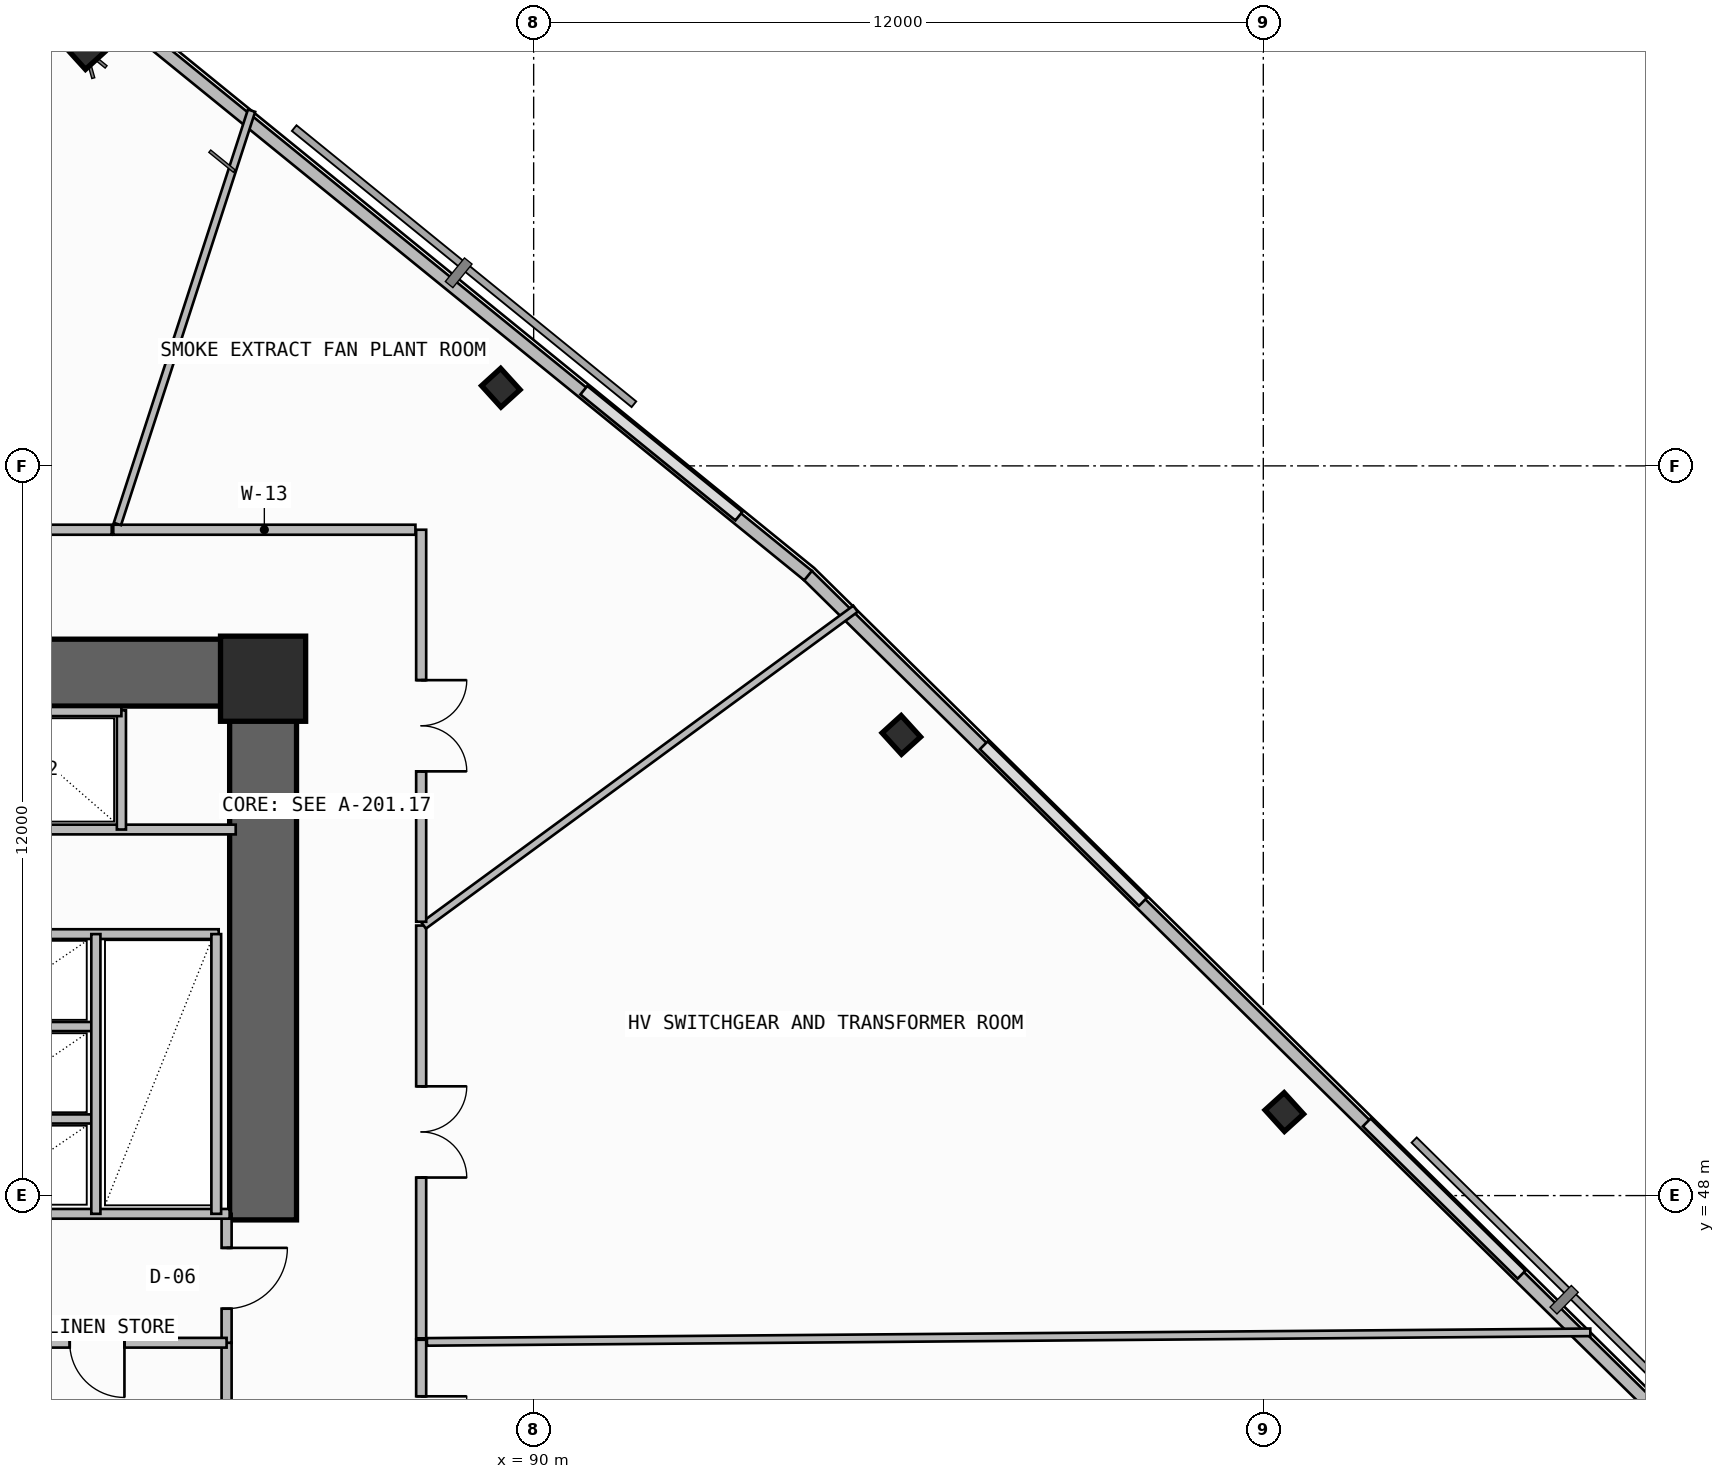
"""IFC4 building model, lengths in metres.
Left out: names, types, materials, properties, quantities, classifications, styles, units other than length and angle.
Written with IfcOpenShell. Run it as: python <this file> out.ifc"""

import sys

from ifc_helpers import new_model, si_unit, direction, frame, frame_2d, origin, origin_2d, place, context, subcontext, project, spatial, rectangle, i_section, extrude, element, fill, save


model = new_model("IFC4")
c1 = context("Model", 3, precision=1e-05, world=origin(), true_north=direction((0.0, 1.0)))
c2 = subcontext(c1, "Body", "Model", "MODEL_VIEW")
j1 = project(units=[si_unit("LENGTHUNIT", "METRE"), si_unit("PLANEANGLEUNIT", "RADIAN")], contexts=[c1])
p1 = place(None, origin())
s1 = spatial("IfcSite", under=j1, at=p1, CompositionType="ELEMENT")
p2 = place(p1, origin())
s2 = spatial("IfcBuilding", under=s1, at=p2, CompositionType="ELEMENT")
p3 = place(p2, frame((0.0, 0.0, 59.1)))
s3 = spatial("IfcBuildingStorey", under=s2, at=p3, CompositionType="ELEMENT", Elevation=59.1)
p4 = place(p3, frame((71.8, 56.6, -0.5), z_axis=(0.0, 0.0, 1.0), x_axis=(1.0, 0.0, 0.0)))
e1 = element("IfcWall", 1, at=p4, inside=s3, PredefinedType="SHEAR", context=c2, shape_type="SweptSolid", body=[
    extrude(rectangle(XDim=14.3, YDim=1.1, at=frame_2d((7.15, 0.0))), origin(), (0.0, 0.0, 1.0), 4.3),
])
p5 = place(p3, frame((85.55, 47.6, -0.5), z_axis=(0.0, 0.0, 1.0), x_axis=(0.0, 1.0, 0.0)))
e2 = element("IfcWall", 2, at=p5, inside=s3, PredefinedType="SHEAR", context=c2, shape_type="SweptSolid", body=[
    extrude(rectangle(XDim=8.45, YDim=1.1, at=frame_2d((4.225, 0.0))), origin(), (0.0, 0.0, 1.0), 4.3),
])
p6 = place(p3, frame((85.55, 56.5, 0.0), z_axis=(0.0, 0.0, 1.0), x_axis=(1.0, 0.0, 0.0)))
e3 = element("IfcColumn", 3, at=p6, inside=s3, PredefinedType="COLUMN", context=c2, shape_type="SweptSolid", body=[
    extrude(rectangle(XDim=1.4, YDim=1.4, at=origin_2d()), origin(), (0.0, 0.0, 1.0), 4.2),
])
for number, where, z_axis, x_axis in (
    (4, (102.345, 49.374, 0.0), (0.0, 0.0, 1.0), (0.74, 0.672, 0.0)),
    (5, (96.047, 55.576, 0.0), (0.0, 0.0, 1.0), (0.74, 0.672, 0.0)),
    (6, (89.46, 61.285, 0.0), (0.0, 0.0, 1.0), (0.74, 0.672, 0.0)),
    (7, (82.627, 66.839, 0.0), (0.0, 0.0, 1.0), (0.74, 0.672, 0.0)),
):
    element("IfcColumn", number, at=place(p3, frame(where, z_axis=z_axis, x_axis=x_axis)), inside=s3, PredefinedType="COLUMN", context=c2, shape_type="SweptSolid", body=[
        extrude(i_section(OverallWidth=0.424, OverallDepth=0.474, WebThickness=0.048, FlangeThickness=0.077, FilletRadius=0.015, at=origin_2d()), origin(), (0.0, 0.0, 1.0), 4.2),
    ])
p7 = place(p3, frame((120.254, 32.848, 0.0), z_axis=(0.0, 0.0, 1.0), x_axis=(-0.71254385441, 0.701627576099, 0.0)))
e8 = element("IfcWall", 8, at=p7, inside=s3, PredefinedType="PARAPET", context=c2, shape_type="SweptSolid", body=[
    extrude(rectangle(XDim=36.142, YDim=0.2, at=frame_2d((18.071, 0.0))), origin(), (0.0, 0.0, 1.0), 1.15),
])
p8 = place(p3, frame((94.513, 58.196, 0.0), z_axis=(0.0, 0.0, 1.0), x_axis=(-0.776001602097, 0.630730935933, 0.0)))
e9 = element("IfcWall", 9, at=p8, inside=s3, PredefinedType="PARAPET", context=c2, shape_type="SweptSolid", body=[
    extrude(rectangle(XDim=36.148, YDim=0.2, at=frame_2d((18.074, 0.0))), origin(), (0.0, 0.0, 1.0), 1.15),
])
p9 = place(p3, frame((84.95, 43.68, 0.0), z_axis=(0.0, 0.0, 1.0), x_axis=(0.0, 1.0, 0.0)))
e10 = element("IfcWall", 10, at=p9, inside=s3, PredefinedType="PLUMBINGWALL", context=c2, shape_type="SweptSolid", body=[
    extrude(rectangle(XDim=1.9, YDim=0.165, at=frame_2d((0.95, 0.0))), origin(), (0.0, 0.0, 1.0), 3.8),
])
p10 = place(p3, frame((84.95, 45.58, 0.0), z_axis=(0.0, 0.0, 1.0), x_axis=(0.0, 1.0, 0.0)))
e11 = element("IfcWall", 11, at=p10, inside=s3, PredefinedType="PARTITIONING", context=c2, shape_type="SweptSolid", body=[
    extrude(rectangle(XDim=2.12, YDim=0.165, at=frame_2d((1.06, 0.0))), origin(), (0.0, 0.0, 1.0), 3.8),
])
p11 = place(p10, frame((0.56, 0.0, 0.0)))
e12 = element("IfcOpeningElement", 12, at=p11, cuts=e11, PredefinedType="OPENING", context=c2, shape_type="SweptSolid", body=[
    extrude(rectangle(XDim=1.0, YDim=2.2, at=frame_2d((0.5, 1.1))), frame((0.0, 0.093, 0.0), z_axis=(0.0, -1.0, 0.0), x_axis=(1.0, 0.0, 0.0)), (0.0, 0.0, 1.0), 0.185),
])
p12 = place(p3, frame((80.72, 45.58, 0.0), z_axis=(0.0, 0.0, 1.0), x_axis=(1.0, 0.0, 0.0)))
e13 = element("IfcWall", 13, at=p12, inside=s3, PredefinedType="PLUMBINGWALL", context=c2, shape_type="SweptSolid", body=[
    extrude(rectangle(XDim=4.23, YDim=0.16, at=frame_2d((2.115, 0.0))), origin(), (0.0, 0.0, 1.0), 3.8),
])
p13 = place(p12, frame((1.65, 0.0, 0.0)))
e14 = element("IfcOpeningElement", 14, at=p13, cuts=e13, PredefinedType="OPENING", context=c2, shape_type="SweptSolid", body=[
    extrude(rectangle(XDim=0.9, YDim=2.1, at=frame_2d((0.45, 1.05))), frame((0.0, 0.09, 0.0), z_axis=(0.0, -1.0, 0.0), x_axis=(1.0, 0.0, 0.0)), (0.0, 0.0, 1.0), 0.18),
])
p14 = place(p3, frame((80.6, 47.7, 0.0), z_axis=(0.0, 0.0, 1.0), x_axis=(1.0, 0.0, 0.0)))
e15 = element("IfcWall", 15, at=p14, inside=s3, PredefinedType="SOLIDWALL", context=c2, shape_type="SweptSolid", body=[
    extrude(rectangle(XDim=4.4, YDim=0.16, at=frame_2d((2.2, 0.0))), origin(), (0.0, 0.0, 1.0), 3.8),
])
p15 = place(p3, frame((80.6, 52.3, 0.0), z_axis=(0.0, 0.0, 1.0), x_axis=(1.0, 0.0, 0.0)))
e16 = element("IfcWall", 16, at=p15, inside=s3, PredefinedType="SOLIDWALL", context=c2, shape_type="SweptSolid", body=[
    extrude(rectangle(XDim=4.22, YDim=0.16, at=frame_2d((2.11, 0.0))), origin(), (0.0, 0.0, 1.0), 3.8),
])
for number, where, z_axis, x_axis in (
    (17, (80.6, 49.26, 0.0), (0.0, 0.0, 1.0), (1.0, 0.0, 0.0)),
    (18, (80.6, 50.78, 0.0), (0.0, 0.0, 1.0), (1.0, 0.0, 0.0)),
):
    element("IfcWall", number, at=place(p3, frame(where, z_axis=z_axis, x_axis=x_axis)), inside=s3, PredefinedType="PLUMBINGWALL", context=c2, shape_type="SweptSolid", body=[
        extrude(rectangle(XDim=2.2, YDim=0.15, at=frame_2d((1.1, 0.0))), origin(), (0.0, 0.0, 1.0), 3.8),
    ])
p16 = place(p3, frame((82.8, 47.7, 0.0), z_axis=(0.0, 0.0, 1.0), x_axis=(0.0, 1.0, 0.0)))
e19 = element("IfcWall", 19, at=p16, inside=s3, PredefinedType="PLUMBINGWALL", context=c2, shape_type="SweptSolid", body=[
    extrude(rectangle(XDim=4.6, YDim=0.15, at=frame_2d((2.3, 0.0))), origin(), (0.0, 0.0, 1.0), 3.8),
])
p17 = place(p3, frame((84.78, 47.7, 0.0), z_axis=(0.0, 0.0, 1.0), x_axis=(0.0, 1.0, 0.0)))
e20 = element("IfcWall", 20, at=p17, inside=s3, PredefinedType="SOLIDWALL", context=c2, shape_type="SweptSolid", body=[
    extrude(rectangle(XDim=4.6, YDim=0.16, at=frame_2d((2.3, 0.0))), origin(), (0.0, 0.0, 1.0), 3.8),
])
p18 = place(p3, frame((73.02, 54.02, 0.0), z_axis=(0.0, 0.0, 1.0), x_axis=(1.0, 0.0, 0.0)))
e21 = element("IfcWall", 21, at=p18, inside=s3, PredefinedType="SOLIDWALL", context=c2, shape_type="SweptSolid", body=[
    extrude(rectangle(XDim=12.08, YDim=0.16, at=frame_2d((6.04, 0.0))), origin(), (0.0, 0.0, 1.0), 3.8),
])
p19 = place(p3, frame((83.22, 54.02, 0.0), z_axis=(0.0, 0.0, 1.0), x_axis=(0.0, 1.0, 0.0)))
e22 = element("IfcWall", 22, at=p19, inside=s3, PredefinedType="SOLIDWALL", context=c2, shape_type="SweptSolid", body=[
    extrude(rectangle(XDim=1.96, YDim=0.15, at=frame_2d((0.98, 0.0))), origin(), (0.0, 0.0, 1.0), 3.8),
])
p20 = place(p3, frame((76.52, 55.96, 0.0), z_axis=(0.0, 0.0, 1.0), x_axis=(1.0, 0.0, 0.0)))
e23 = element("IfcWall", 23, at=p20, inside=s3, PredefinedType="SOLIDWALL", context=c2, shape_type="SweptSolid", body=[
    extrude(rectangle(XDim=6.7, YDim=0.15, at=frame_2d((3.35, 0.0))), origin(), (0.0, 0.0, 1.0), 3.8),
])
p21 = place(p3, frame((88.15, 42.269, 0.0), z_axis=(0.0, 0.0, 1.0), x_axis=(0.0, 1.0, 0.0)))
e24 = element("IfcWall", 24, at=p21, inside=s3, PredefinedType="PARTITIONING", context=c2, shape_type="SweptSolid", body=[
    extrude(rectangle(XDim=3.36, YDim=0.165, at=frame_2d((1.68, 0.0))), origin(), (0.0, 0.0, 1.0), 2.777),
])
p22 = place(p21, frame((0.93, 0.0, 0.0)))
e25 = element("IfcOpeningElement", 25, at=p22, cuts=e24, PredefinedType="OPENING", context=c2, shape_type="SweptSolid", body=[
    extrude(rectangle(XDim=1.5, YDim=2.25, at=frame_2d((0.75, 1.125))), frame((0.0, 0.093, 0.0), z_axis=(0.0, -1.0, 0.0), x_axis=(1.0, 0.0, 0.0)), (0.0, 0.0, 1.0), 0.185),
])
p23 = place(p3, frame((88.244, 45.594, 0.0), z_axis=(0.0, 0.0, 1.0), x_axis=(0.999966031218, 0.008242354589, 0.0)))
e26 = element("IfcWall", 26, at=p23, inside=s3, PredefinedType="PARTITIONING", context=c2, shape_type="SweptSolid", body=[
    extrude(rectangle(XDim=19.135, YDim=0.125, at=frame_2d((9.567, 0.0))), origin(), (0.0, 0.0, 1.0), 2.777),
])
p24 = place(p3, frame((88.15, 45.653, 0.0), z_axis=(0.0, 0.0, 1.0), x_axis=(0.0, 1.0, 0.0)))
e27 = element("IfcWall", 27, at=p24, inside=s3, PredefinedType="PARTITIONING", context=c2, shape_type="SweptSolid", body=[
    extrude(rectangle(XDim=6.788, YDim=0.165, at=frame_2d((3.394, 0.0))), origin(), (0.0, 0.0, 1.0), 3.8),
])
p25 = place(p24, frame((2.644, 0.0, 0.0)))
e28 = element("IfcOpeningElement", 28, at=p25, cuts=e27, PredefinedType="OPENING", context=c2, shape_type="SweptSolid", body=[
    extrude(rectangle(XDim=1.5, YDim=2.25, at=frame_2d((0.75, 1.125))), frame((0.0, 0.093, 0.0), z_axis=(0.0, -1.0, 0.0), x_axis=(1.0, 0.0, 0.0)), (0.0, 0.0, 1.0), 0.185),
])
p26 = place(p3, frame((88.191, 52.441, 0.0), z_axis=(0.0, 0.0, 1.0), x_axis=(0.806317750357, 0.591482616363, 0.0)))
e29 = element("IfcWall", 29, at=p26, inside=s3, PredefinedType="PARTITIONING", context=c2, shape_type="SweptSolid", body=[
    extrude(rectangle(XDim=8.808, YDim=0.125, at=frame_2d((4.404, 0.0))), origin(), (0.0, 0.0, 1.0), 2.777),
])
p27 = place(p3, frame((88.15, 52.503, 0.0), z_axis=(0.0, 0.0, 1.0), x_axis=(0.0, 1.0, 0.0)))
e30 = element("IfcWall", 30, at=p27, inside=s3, PredefinedType="PARTITIONING", context=c2, shape_type="SweptSolid", body=[
    extrude(rectangle(XDim=6.447, YDim=0.165, at=frame_2d((3.224, 0.0))), origin(), (0.0, 0.0, 1.0), 2.777),
])
p28 = place(p27, frame((2.473, 0.0, 0.0)))
e31 = element("IfcOpeningElement", 31, at=p28, cuts=e30, PredefinedType="OPENING", context=c2, shape_type="SweptSolid", body=[
    extrude(rectangle(XDim=1.5, YDim=2.25, at=frame_2d((0.75, 1.125))), frame((0.0, 0.093, 0.0), z_axis=(0.0, -1.0, 0.0), x_axis=(1.0, 0.0, 0.0)), (0.0, 0.0, 1.0), 0.185),
])
p29 = place(p3, frame((88.055, 58.95, 0.0), z_axis=(0.0, 0.0, 1.0), x_axis=(-1.0, 0.0, 0.0)))
e32 = element("IfcWall", 32, at=p29, inside=s3, PredefinedType="PARTITIONING", context=c2, shape_type="SweptSolid", body=[
    extrude(rectangle(XDim=4.969, YDim=0.165, at=frame_2d((2.485, 0.0))), origin(), (0.0, 0.0, 1.0), 2.777),
])
p30 = place(p3, frame((83.155, 59.044, 0.0), z_axis=(0.0, 0.0, 1.0), x_axis=(0.308684326179, 0.951164542427, 0.0)))
e33 = element("IfcWall", 33, at=p30, inside=s3, PredefinedType="PARTITIONING", context=c2, shape_type="SweptSolid", body=[
    extrude(rectangle(XDim=7.146, YDim=0.125, at=frame_2d((3.573, 0.0))), origin(), (0.0, 0.0, 1.0), 2.777),
])
p31 = place(p3, frame((83.061, 58.95, 0.0), z_axis=(0.0, 0.0, 1.0), x_axis=(-1.0, 0.0, 0.0)))
e34 = element("IfcWall", 34, at=p31, inside=s3, PredefinedType="PARTITIONING", context=c2, shape_type="SweptSolid", body=[
    extrude(rectangle(XDim=8.65, YDim=0.165, at=frame_2d((4.325, 0.0))), origin(), (0.0, 0.0, 1.0), 3.8),
])
p32 = place(p31, frame((3.575, 0.0, 0.0)))
e35 = element("IfcOpeningElement", 35, at=p32, cuts=e34, PredefinedType="OPENING", context=c2, shape_type="SweptSolid", body=[
    extrude(rectangle(XDim=1.5, YDim=2.25, at=frame_2d((0.75, 1.125))), frame((0.0, 0.093, 0.0), z_axis=(0.0, -1.0, 0.0), x_axis=(1.0, 0.0, 0.0)), (0.0, 0.0, 1.0), 0.185),
])
p33 = place(p11, frame((1.0, 0.0, 0.0), z_axis=(0.0, 0.0, 1.0), x_axis=(-1.0, 0.0, 0.0)))
e36 = element("IfcDoor", 36, at=p33, inside=s3, OperationType="SINGLE_SWING_LEFT", PredefinedType="DOOR", context=c2, shape_type="SweptSolid", body=[
    extrude(rectangle(XDim=1.0, YDim=2.2, at=frame_2d((0.5, 1.1))), frame((0.0, 0.025, 0.0), z_axis=(0.0, -1.0, 0.0), x_axis=(1.0, 0.0, 0.0)), (0.0, 0.0, 1.0), 0.05),
])
fill(e12, e36)
p34 = place(p13, frame((0.9, 0.0, 0.0), z_axis=(0.0, 0.0, 1.0), x_axis=(-1.0, 0.0, 0.0)))
e37 = element("IfcDoor", 37, at=p34, inside=s3, OperationType="SINGLE_SWING_LEFT", PredefinedType="DOOR", context=c2, shape_type="SweptSolid", body=[
    extrude(rectangle(XDim=0.9, YDim=2.1, at=frame_2d((0.45, 1.05))), frame((0.0, 0.025, 0.0), z_axis=(0.0, -1.0, 0.0), x_axis=(1.0, 0.0, 0.0)), (0.0, 0.0, 1.0), 0.05),
])
fill(e14, e37)
p35 = place(p22, frame((1.5, 0.0, 0.0), z_axis=(0.0, 0.0, 1.0), x_axis=(-1.0, 0.0, 0.0)))
e38 = element("IfcDoor", 38, at=p35, inside=s3, OperationType="DOUBLE_DOOR_SINGLE_SWING", PredefinedType="DOOR", context=c2, shape_type="SweptSolid", body=[
    extrude(rectangle(XDim=1.5, YDim=2.25, at=frame_2d((0.75, 1.125))), frame((0.0, 0.025, 0.0), z_axis=(0.0, -1.0, 0.0), x_axis=(1.0, 0.0, 0.0)), (0.0, 0.0, 1.0), 0.05),
])
fill(e25, e38)
p36 = place(p25, frame((1.5, 0.0, 0.0), z_axis=(0.0, 0.0, 1.0), x_axis=(-1.0, 0.0, 0.0)))
e39 = element("IfcDoor", 39, at=p36, inside=s3, OperationType="DOUBLE_DOOR_SINGLE_SWING", PredefinedType="DOOR", context=c2, shape_type="SweptSolid", body=[
    extrude(rectangle(XDim=1.5, YDim=2.25, at=frame_2d((0.75, 1.125))), frame((0.0, 0.025, 0.0), z_axis=(0.0, -1.0, 0.0), x_axis=(1.0, 0.0, 0.0)), (0.0, 0.0, 1.0), 0.05),
])
fill(e28, e39)
p37 = place(p28, frame((1.5, 0.0, 0.0), z_axis=(0.0, 0.0, 1.0), x_axis=(-1.0, 0.0, 0.0)))
e40 = element("IfcDoor", 40, at=p37, inside=s3, OperationType="DOUBLE_DOOR_SINGLE_SWING", PredefinedType="DOOR", context=c2, shape_type="SweptSolid", body=[
    extrude(rectangle(XDim=1.5, YDim=2.25, at=frame_2d((0.75, 1.125))), frame((0.0, 0.025, 0.0), z_axis=(0.0, -1.0, 0.0), x_axis=(1.0, 0.0, 0.0)), (0.0, 0.0, 1.0), 0.05),
])
fill(e31, e40)
save(model, sys.argv[1])
